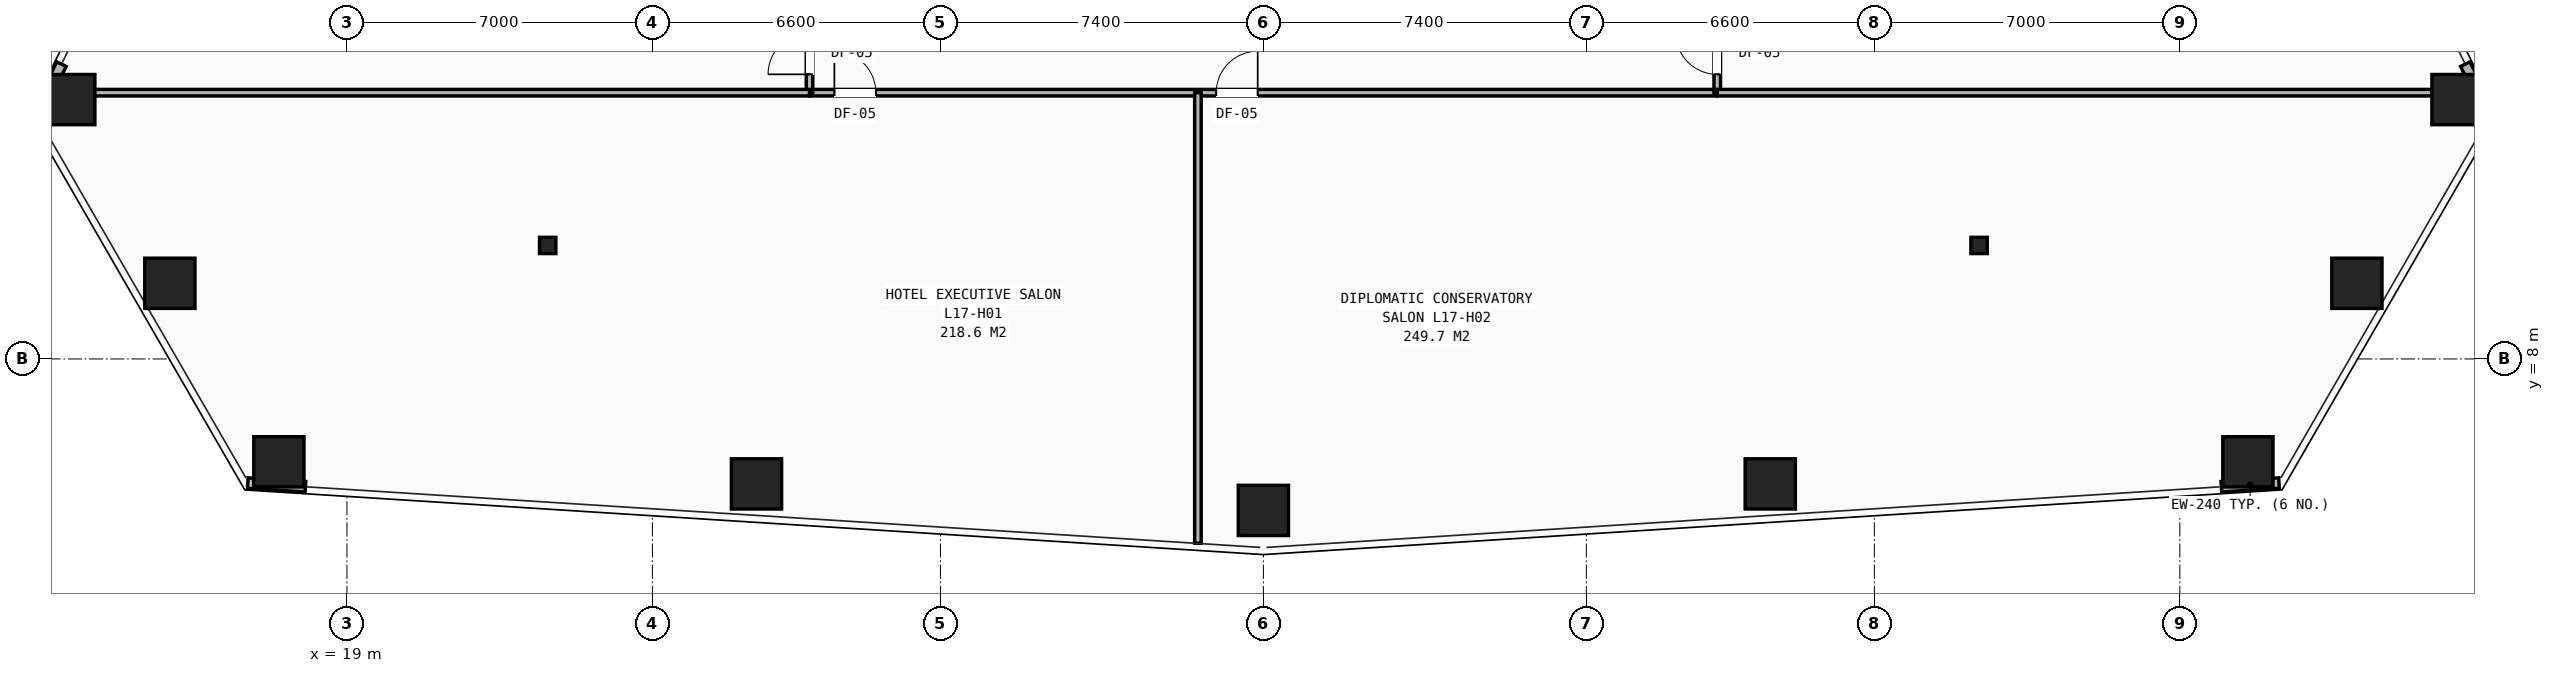
"""IFC4 building model, lengths in metres.
Left out: names, types, materials, properties, quantities, classifications, styles, units other than length and angle.
Written with IfcOpenShell. Run it as: python <this file> out.ifc"""

import sys

from ifc_helpers import new_model, si_unit, direction, frame, frame_2d, origin, origin_2d, place, context, subcontext, project, spatial, rectangle, hollow_rectangle, i_section, extrude, element, fill, save


model = new_model("IFC4")
c1 = context("Model", 3, precision=1e-05, world=origin(), true_north=direction((0.0, 1.0)))
c2 = subcontext(c1, "Body", "Model", "MODEL_VIEW")
j1 = project(units=[si_unit("LENGTHUNIT", "METRE"), si_unit("PLANEANGLEUNIT", "RADIAN")], contexts=[c1])
p1 = place(None, origin())
s1 = spatial("IfcSite", under=j1, at=p1, CompositionType="ELEMENT")
p2 = place(p1, origin())
s2 = spatial("IfcBuilding", under=s1, at=p2, CompositionType="ELEMENT")
p3 = place(p2, frame((0.0, 0.0, 62.4)))
s3 = spatial("IfcBuildingStorey", under=s2, at=p3, CompositionType="ELEMENT", Elevation=62.4)
for number, where, z_axis, x_axis in (
    (1, (23.6, 10.6, 0.0), (0.0, 0.0, 1.0), (1.0, 0.0, 0.0)),
    (2, (56.4, 10.6, 0.0), (0.0, 0.0, 1.0), (1.0, 0.0, 0.0)),
):
    element("IfcColumn", number, at=place(p3, frame(where, z_axis=z_axis, x_axis=x_axis)), inside=s3, PredefinedType="COLUMN", context=c2, shape_type="SweptSolid", body=[
        extrude(i_section(OverallWidth=0.374, OverallDepth=0.372, WebThickness=0.016, FlangeThickness=0.026, at=origin_2d()), origin(), (0.0, 0.0, 1.0), 3.2),
    ])
for number, where, z_axis, x_axis in (
    (3, (12.649, 13.941, 0.0), (0.0, 0.0, 1.0), (1.0, 0.0, 0.0)),
    (4, (14.942, 9.733, 0.0), (0.0, 0.0, 1.0), (1.0, 0.0, 0.0)),
    (5, (17.44, 5.643, 0.0), (0.0, 0.0, 1.0), (1.0, 0.0, 0.0)),
    (6, (28.385, 5.137, 0.0), (0.0, 0.0, 1.0), (1.0, 0.0, 0.0)),
    (7, (40.0, 4.53, 0.0), (0.0, 0.0, 1.0), (1.0, 0.0, 0.0)),
    (8, (51.615, 5.137, 0.0), (0.0, 0.0, 1.0), (1.0, 0.0, 0.0)),
    (9, (62.56, 5.643, 0.0), (0.0, 0.0, 1.0), (1.0, 0.0, 0.0)),
    (10, (65.058, 9.733, 0.0), (0.0, 0.0, 1.0), (1.0, 0.0, 0.0)),
    (11, (67.351, 13.941, 0.0), (0.0, 0.0, 1.0), (1.0, 0.0, 0.0)),
):
    element("IfcColumn", number, at=place(p3, frame(where, z_axis=z_axis, x_axis=x_axis)), inside=s3, PredefinedType="COLUMN", context=c2, shape_type="SweptSolid", body=[
        extrude(hollow_rectangle(XDim=1.15, YDim=1.15, WallThickness=0.075, at=origin_2d()), origin(), (0.0, 0.0, 1.0), 3.2),
    ])
p4 = place(p3, frame((12.459, 14.754, 0.0), z_axis=(0.0, 0.0, 1.0), x_axis=(-0.444037765369, -0.896008070793, 0.0)))
e12 = element("IfcWall", 12, at=p4, inside=s3, PredefinedType="SHEAR", context=c2, shape_type="SweptSolid", body=[
    extrude(rectangle(XDim=1.323, YDim=0.24, at=frame_2d((0.662, 0.0))), origin(), (0.0, 0.0, 1.0), 2.263),
])
for number, where, z_axis, x_axis in (
    (13, (16.728, 5.156, 0.0), (0.0, 0.0, 1.0), (0.998, -0.063, 0.0)),
    (14, (61.951, 5.072, 0.0), (0.0, 0.0, 1.0), (0.998, 0.063, 0.0)),
):
    element("IfcWall", number, at=place(p3, frame(where, z_axis=z_axis, x_axis=x_axis)), inside=s3, PredefinedType="SHEAR", context=c2, shape_type="SweptSolid", body=[
        extrude(rectangle(XDim=1.324, YDim=0.24, at=frame_2d((0.662, 0.0))), origin(), (0.0, 0.0, 1.0), 2.263),
    ])
p5 = place(p3, frame((68.129, 13.568, 0.0), z_axis=(0.0, 0.0, 1.0), x_axis=(-0.444037765369, 0.896008070793, 0.0)))
e15 = element("IfcWall", 15, at=p5, inside=s3, PredefinedType="SHEAR", context=c2, shape_type="SweptSolid", body=[
    extrude(rectangle(XDim=1.323, YDim=0.24, at=frame_2d((0.662, 0.0))), origin(), (0.0, 0.0, 1.0), 2.263),
])
p6 = place(p3, frame((29.6, 14.1, 0.0), z_axis=(0.0, 0.0, 1.0), x_axis=(1.0, 0.0, 0.0)))
e16 = element("IfcWall", 16, at=p6, inside=s3, PredefinedType="PARTITIONING", context=c2, shape_type="SweptSolid", body=[
    extrude(rectangle(XDim=20.8, YDim=0.15, at=frame_2d((10.4, 0.0))), origin(), (0.0, 0.0, 1.0), 2.431),
])
p7 = place(p6, frame((0.57, 0.0, 0.0)))
e17 = element("IfcOpeningElement", 17, at=p7, cuts=e16, PredefinedType="OPENING", context=c2, shape_type="SweptSolid", body=[
    extrude(rectangle(XDim=0.95, YDim=2.1, at=frame_2d((0.475, 1.05))), frame((0.0, 0.085, 0.0), z_axis=(0.0, -1.0, 0.0), x_axis=(1.0, 0.0, 0.0)), (0.0, 0.0, 1.0), 0.17),
])
p8 = place(p6, frame((9.32, 0.0, 0.0)))
e18 = element("IfcOpeningElement", 18, at=p8, cuts=e16, PredefinedType="OPENING", context=c2, shape_type="SweptSolid", body=[
    extrude(rectangle(XDim=0.95, YDim=2.1, at=frame_2d((0.475, 1.05))), frame((0.0, 0.085, 0.0), z_axis=(0.0, -1.0, 0.0), x_axis=(1.0, 0.0, 0.0)), (0.0, 0.0, 1.0), 0.17),
])
p9 = place(p3, frame((29.6, 14.1, 0.0), z_axis=(0.0, 0.0, 1.0), x_axis=(0.0, 1.0, 0.0)))
e19 = element("IfcWall", 19, at=p9, inside=s3, PredefinedType="PARTITIONING", context=c2, shape_type="SweptSolid", body=[
    extrude(rectangle(XDim=21.9, YDim=0.15, at=frame_2d((10.95, 0.0))), origin(), (0.0, 0.0, 1.0), 2.431),
])
p10 = place(p9, frame((0.42, 0.0, 0.0)))
e20 = element("IfcOpeningElement", 20, at=p10, cuts=e19, PredefinedType="OPENING", context=c2, shape_type="SweptSolid", body=[
    extrude(rectangle(XDim=0.95, YDim=2.1, at=frame_2d((0.475, 1.05))), frame((0.0, 0.085, 0.0), z_axis=(0.0, -1.0, 0.0), x_axis=(1.0, 0.0, 0.0)), (0.0, 0.0, 1.0), 0.17),
])
p11 = place(p3, frame((50.4, 14.1, 0.0), z_axis=(0.0, 0.0, 1.0), x_axis=(0.0, 1.0, 0.0)))
e21 = element("IfcWall", 21, at=p11, inside=s3, PredefinedType="PARTITIONING", context=c2, shape_type="SweptSolid", body=[
    extrude(rectangle(XDim=21.9, YDim=0.15, at=frame_2d((10.95, 0.0))), origin(), (0.0, 0.0, 1.0), 2.431),
])
p12 = place(p11, frame((0.42, 0.0, 0.0)))
e22 = element("IfcOpeningElement", 22, at=p12, cuts=e21, PredefinedType="OPENING", context=c2, shape_type="SweptSolid", body=[
    extrude(rectangle(XDim=0.95, YDim=2.1, at=frame_2d((0.475, 1.05))), frame((0.0, 0.085, 0.0), z_axis=(0.0, -1.0, 0.0), x_axis=(1.0, 0.0, 0.0)), (0.0, 0.0, 1.0), 0.17),
])
p13 = place(p11, frame((11.32, 0.0, 0.0)))
e23 = element("IfcOpeningElement", 23, at=p13, cuts=e21, PredefinedType="OPENING", context=c2, shape_type="SweptSolid", body=[
    extrude(rectangle(XDim=0.95, YDim=2.1, at=frame_2d((0.475, 1.05))), frame((0.0, 0.085, 0.0), z_axis=(0.0, -1.0, 0.0), x_axis=(1.0, 0.0, 0.0)), (0.0, 0.0, 1.0), 0.17),
])
p14 = place(p3, frame((38.5, 3.778, 0.0), z_axis=(0.0, 0.0, 1.0), x_axis=(0.0, 1.0, 0.0)))
e24 = element("IfcWall", 24, at=p14, inside=s3, PredefinedType="PARTITIONING", context=c2, shape_type="SweptSolid", body=[
    extrude(rectangle(XDim=10.322, YDim=0.15, at=frame_2d((5.161, 0.0))), origin(), (0.0, 0.0, 1.0), 2.268),
])
for number, where, z_axis, x_axis in (
    (25, (12.141, 14.1, 0.0), (0.0, 0.0, 1.0), (1.0, 0.0, 0.0)),
    (26, (50.4, 14.1, 0.0), (0.0, 0.0, 1.0), (1.0, 0.0, 0.0)),
):
    element("IfcWall", number, at=place(p3, frame(where, z_axis=z_axis, x_axis=x_axis)), inside=s3, PredefinedType="PARTITIONING", context=c2, shape_type="SweptSolid", body=[
        extrude(rectangle(XDim=17.459, YDim=0.15, at=frame_2d((8.73, 0.0))), origin(), (0.0, 0.0, 1.0), 2.268),
    ])
p15 = place(p7, origin())
e27 = element("IfcDoor", 27, at=p15, inside=s3, OperationType="SINGLE_SWING_LEFT", PredefinedType="DOOR", context=c2, shape_type="SweptSolid", body=[
    extrude(rectangle(XDim=0.95, YDim=2.1, at=frame_2d((0.475, 1.05))), frame((0.0, 0.025, 0.0), z_axis=(0.0, -1.0, 0.0), x_axis=(1.0, 0.0, 0.0)), (0.0, 0.0, 1.0), 0.05),
])
fill(e17, e27)
p16 = place(p8, origin())
e28 = element("IfcDoor", 28, at=p16, inside=s3, OperationType="SINGLE_SWING_RIGHT", PredefinedType="DOOR", context=c2, shape_type="SweptSolid", body=[
    extrude(rectangle(XDim=0.95, YDim=2.1, at=frame_2d((0.475, 1.05))), frame((0.0, 0.025, 0.0), z_axis=(0.0, -1.0, 0.0), x_axis=(1.0, 0.0, 0.0)), (0.0, 0.0, 1.0), 0.05),
])
fill(e18, e28)
p17 = place(p10, origin())
e29 = element("IfcDoor", 29, at=p17, inside=s3, OperationType="SINGLE_SWING_LEFT", PredefinedType="DOOR", context=c2, shape_type="SweptSolid", body=[
    extrude(rectangle(XDim=0.95, YDim=2.1, at=frame_2d((0.475, 1.05))), frame((0.0, 0.025, 0.0), z_axis=(0.0, -1.0, 0.0), x_axis=(1.0, 0.0, 0.0)), (0.0, 0.0, 1.0), 0.05),
])
fill(e20, e29)
p18 = place(p12, origin())
e30 = element("IfcDoor", 30, at=p18, inside=s3, OperationType="SINGLE_SWING_RIGHT", PredefinedType="DOOR", context=c2, shape_type="SweptSolid", body=[
    extrude(rectangle(XDim=0.95, YDim=2.1, at=frame_2d((0.475, 1.05))), frame((0.0, 0.025, 0.0), z_axis=(0.0, -1.0, 0.0), x_axis=(1.0, 0.0, 0.0)), (0.0, 0.0, 1.0), 0.05),
])
fill(e22, e30)
save(model, sys.argv[1])
